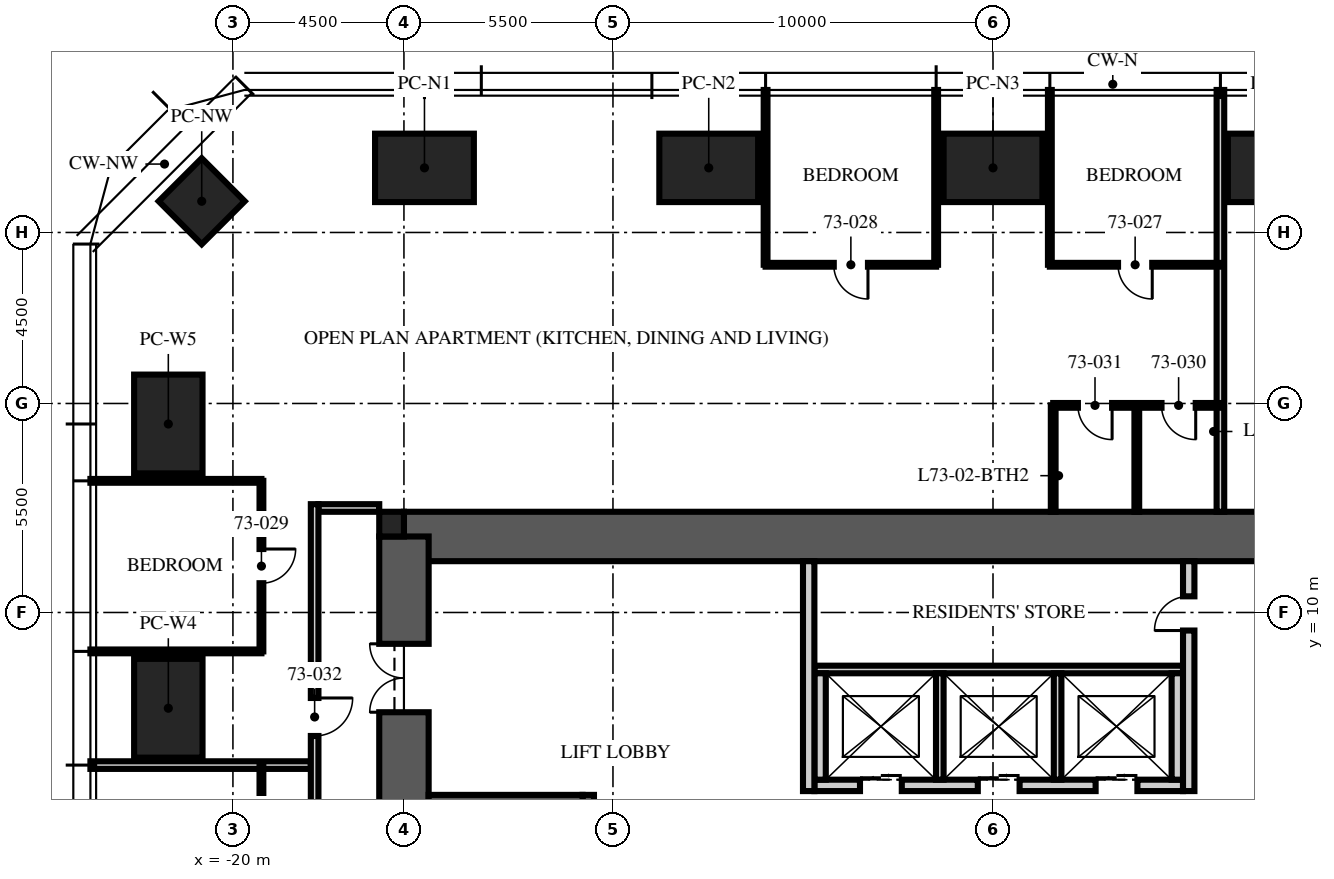
"""IFC4 building model, lengths in metres.
Left out: names, types, materials, properties, quantities, classifications, styles, units other than length and angle.
Written with IfcOpenShell. Run it as: python <this file> out.ifc"""

import sys

from ifc_helpers import new_model, si_unit, direction, frame, frame_2d, origin, origin_2d, place, context, subcontext, project, spatial, rectangle, extrude, element, fill, save


model = new_model("IFC4")
c1 = context("Model", 3, precision=1e-05, world=origin(), true_north=direction((0.0, 1.0)))
c2 = subcontext(c1, "Body", "Model", "MODEL_VIEW")
j1 = project(units=[si_unit("LENGTHUNIT", "METRE"), si_unit("PLANEANGLEUNIT", "RADIAN")], contexts=[c1])
p1 = place(None, origin())
s1 = spatial("IfcSite", under=j1, at=p1, CompositionType="ELEMENT")
p2 = place(p1, origin())
s2 = spatial("IfcBuilding", under=s1, at=p2, CompositionType="ELEMENT")
p3 = place(p2, frame((0.0, 0.0, 293.25)))
s3 = spatial("IfcBuildingStorey", under=s2, at=p3, CompositionType="ELEMENT", Elevation=293.25)
p4 = place(p3, frame((-15.5, 12.0, -0.25), z_axis=(0.0, 0.0, 1.0), x_axis=(1.0, 0.0, 0.0)))
e1 = element("IfcWall", 1, at=p4, inside=s3, PredefinedType="SHEAR", context=c2, shape_type="SweptSolid", body=[
    extrude(rectangle(XDim=31.0, YDim=1.3, at=frame_2d((15.5, 0.0))), origin(), (0.0, 0.0, 1.0), 3.75),
])
p5 = place(p3, frame((-15.5, -12.0, -0.25), z_axis=(0.0, 0.0, 1.0), x_axis=(0.0, 1.0, 0.0)))
e2 = element("IfcWall", 2, at=p5, inside=s3, PredefinedType="SHEAR", context=c2, shape_type="SweptSolid", body=[
    extrude(rectangle(XDim=24.0, YDim=1.3, at=frame_2d((12.0, 0.0))), origin(), (0.0, 0.0, 1.0), 3.75),
])
p6 = place(p5, frame((3.125, 0.0, 0.25)))
e3 = element("IfcOpeningElement", 3, at=p6, cuts=e2, PredefinedType="OPENING", context=c2, shape_type="SweptSolid", body=[
    extrude(rectangle(XDim=1.2, YDim=2.1, at=frame_2d((0.6, 1.05))), frame((0.0, 0.66, 0.0), z_axis=(0.0, -1.0, 0.0), x_axis=(1.0, 0.0, 0.0)), (0.0, 0.0, 1.0), 1.32),
])
p7 = place(p5, frame((19.375, 0.0, 0.25)))
e4 = element("IfcOpeningElement", 4, at=p7, cuts=e2, PredefinedType="OPENING", context=c2, shape_type="SweptSolid", body=[
    extrude(rectangle(XDim=1.8, YDim=2.1, at=frame_2d((0.9, 1.05))), frame((0.0, 0.66, 0.0), z_axis=(0.0, -1.0, 0.0), x_axis=(1.0, 0.0, 0.0)), (0.0, 0.0, 1.0), 1.32),
])
p8 = place(p3, frame((-15.825, 12.325, -0.25), z_axis=(0.0, 0.0, 1.0), x_axis=(1.0, 0.0, 0.0)))
e5 = element("IfcColumn", 5, at=p8, inside=s3, PredefinedType="COLUMN", context=c2, shape_type="SweptSolid", body=[
    extrude(rectangle(XDim=0.65, YDim=0.65, at=origin_2d()), origin(), (0.0, 0.0, 1.0), 3.75),
])
for number, where, z_axis, x_axis in (
    (6, (-14.96, 21.7, 0.0), (0.0, 0.0, 1.0), (1.0, 0.0, 0.0)),
    (7, (-7.48, 21.7, 0.0), (0.0, 0.0, 1.0), (1.0, 0.0, 0.0)),
    (8, (0.0, 21.7, 0.0), (0.0, 0.0, 1.0), (1.0, 0.0, 0.0)),
    (9, (7.48, 21.7, 0.0), (0.0, 0.0, 1.0), (1.0, 0.0, 0.0)),
    (10, (-21.7, 7.48, 0.0), (0.0, 0.0, 1.0), (0.0, 1.0, 0.0)),
    (11, (-21.7, 14.96, 0.0), (0.0, 0.0, 1.0), (0.0, 1.0, 0.0)),
):
    element("IfcColumn", number, at=place(p3, frame(where, z_axis=z_axis, x_axis=x_axis)), inside=s3, PredefinedType="COLUMN", context=c2, shape_type="SweptSolid", body=[
        extrude(rectangle(XDim=2.6, YDim=1.8, at=origin_2d()), origin(), (0.0, 0.0, 1.0), 3.75),
    ])
p9 = place(p3, frame((-20.821, 20.821, 0.0), z_axis=(0.0, 0.0, 1.0), x_axis=(0.707106781187, 0.707106781187, 0.0)))
e12 = element("IfcColumn", 12, at=p9, inside=s3, PredefinedType="COLUMN", context=c2, shape_type="SweptSolid", body=[
    extrude(rectangle(XDim=1.6, YDim=1.6, at=origin_2d()), origin(), (0.0, 0.0, 1.0), 3.75),
])
p10 = place(p3, frame((-10.65, -4.9, 0.0), z_axis=(0.0, 0.0, 1.0), x_axis=(0.0, 1.0, 0.0)))
e13 = element("IfcWall", 13, at=p10, inside=s3, PredefinedType="SOLIDWALL", context=c2, shape_type="SweptSolid", body=[
    extrude(rectangle(XDim=10.1, YDim=0.3, at=frame_2d((5.05, 0.0))), origin(), (0.0, 0.0, 1.0), 3.5),
])
p11 = place(p3, frame((-14.85, 5.05, 0.0), z_axis=(0.0, 0.0, 1.0), x_axis=(1.0, 0.0, 0.0)))
e14 = element("IfcWall", 14, at=p11, inside=s3, PredefinedType="SOLIDWALL", context=c2, shape_type="SweptSolid", body=[
    extrude(rectangle(XDim=4.05, YDim=0.3, at=frame_2d((2.025, 0.0))), origin(), (0.0, 0.0, 1.0), 3.5),
])
p12 = place(p3, frame((-4.7, 5.45, 0.0), z_axis=(0.0, 0.0, 1.0), x_axis=(1.0, 0.0, 0.0)))
e15 = element("IfcWall", 15, at=p12, inside=s3, PredefinedType="PARTITIONING", context=c2, shape_type="SweptSolid", body=[
    extrude(rectangle(XDim=9.7, YDim=0.3, at=frame_2d((4.85, 0.0))), origin(), (0.0, 0.0, 1.0), 3.5),
])
p13 = place(p12, frame((1.2, 0.0, 0.0)))
e16 = element("IfcOpeningElement", 16, at=p13, cuts=e15, PredefinedType="OPENING", context=c2, shape_type="SweptSolid", body=[
    extrude(rectangle(XDim=1.1, YDim=2.1, at=frame_2d((0.55, 1.05))), frame((0.0, 0.16, 0.0), z_axis=(0.0, -1.0, 0.0), x_axis=(1.0, 0.0, 0.0)), (0.0, 0.0, 1.0), 0.32),
])
p14 = place(p12, frame((4.3, 0.0, 0.0)))
e17 = element("IfcOpeningElement", 17, at=p14, cuts=e15, PredefinedType="OPENING", context=c2, shape_type="SweptSolid", body=[
    extrude(rectangle(XDim=1.1, YDim=2.1, at=frame_2d((0.55, 1.05))), frame((0.0, 0.16, 0.0), z_axis=(0.0, -1.0, 0.0), x_axis=(1.0, 0.0, 0.0)), (0.0, 0.0, 1.0), 0.32),
])
p15 = place(p12, frame((7.4, 0.0, 0.0)))
e18 = element("IfcOpeningElement", 18, at=p15, cuts=e15, PredefinedType="OPENING", context=c2, shape_type="SweptSolid", body=[
    extrude(rectangle(XDim=1.1, YDim=2.1, at=frame_2d((0.55, 1.05))), frame((0.0, 0.16, 0.0), z_axis=(0.0, -1.0, 0.0), x_axis=(1.0, 0.0, 0.0)), (0.0, 0.0, 1.0), 0.32),
])
p16 = place(p3, frame((-4.7, 8.5, 0.0), z_axis=(0.0, 0.0, 1.0), x_axis=(1.0, 0.0, 0.0)))
e19 = element("IfcWall", 19, at=p16, inside=s3, PredefinedType="PARTITIONING", context=c2, shape_type="SweptSolid", body=[
    extrude(rectangle(XDim=9.7, YDim=0.2, at=frame_2d((4.85, 0.0))), origin(), (0.0, 0.0, 1.0), 3.5),
])
for number, where, z_axis, x_axis in (
    (20, (-4.55, 5.6, 0.0), (0.0, 0.0, 1.0), (0.0, 1.0, 0.0)),
    (21, (4.85, 5.6, 0.0), (0.0, 0.0, 1.0), (0.0, 1.0, 0.0)),
):
    element("IfcWall", number, at=place(p3, frame(where, z_axis=z_axis, x_axis=x_axis)), inside=s3, PredefinedType="PARTITIONING", context=c2, shape_type="SweptSolid", body=[
        extrude(rectangle(XDim=2.8, YDim=0.3, at=frame_2d((1.4, 0.0))), origin(), (0.0, 0.0, 1.0), 3.5),
    ])
for number, where, z_axis, x_axis in (
    (22, (-1.4, 5.6, 0.0), (0.0, 0.0, 1.0), (0.0, 1.0, 0.0)),
    (23, (1.7, 5.6, 0.0), (0.0, 0.0, 1.0), (0.0, 1.0, 0.0)),
):
    element("IfcWall", number, at=place(p3, frame(where, z_axis=z_axis, x_axis=x_axis)), inside=s3, PredefinedType="PARTITIONING", context=c2, shape_type="SweptSolid", body=[
        extrude(rectangle(XDim=2.8, YDim=0.2, at=frame_2d((1.4, 0.0))), origin(), (0.0, 0.0, 1.0), 3.5),
    ])
p17 = place(p3, frame((-4.85, 5.3, 0.0), z_axis=(0.0, 0.0, 1.0), x_axis=(0.0, 1.0, 0.0)))
e24 = element("IfcWall", 24, at=p17, inside=s3, PredefinedType="PARTITIONING", context=c2, shape_type="SweptSolid", body=[
    extrude(rectangle(XDim=6.05, YDim=0.3, at=frame_2d((3.025, 0.0))), origin(), (0.0, 0.0, 1.0), 3.5),
])
p18 = place(p3, frame((5.15, 5.3, 0.0), z_axis=(0.0, 0.0, 1.0), x_axis=(0.0, 1.0, 0.0)))
e25 = element("IfcWall", 25, at=p18, inside=s3, PredefinedType="PARTITIONING", context=c2, shape_type="SweptSolid", body=[
    extrude(rectangle(XDim=6.05, YDim=0.3, at=frame_2d((3.025, 0.0))), origin(), (0.0, 0.0, 1.0), 3.5),
])
p19 = place(p18, frame((4.225, 0.0, 0.0)))
e26 = element("IfcOpeningElement", 26, at=p19, cuts=e25, PredefinedType="OPENING", context=c2, shape_type="SweptSolid", body=[
    extrude(rectangle(XDim=0.9, YDim=2.1, at=frame_2d((0.45, 1.05))), frame((0.0, 0.16, 0.0), z_axis=(0.0, -1.0, 0.0), x_axis=(1.0, 0.0, 0.0)), (0.0, 0.0, 1.0), 0.32),
])
p20 = place(p3, frame((-16.15, 12.75, 0.0), z_axis=(0.0, 0.0, 1.0), x_axis=(-1.0, 0.0, 0.0)))
e27 = element("IfcWall", 27, at=p20, inside=s3, PredefinedType="PARTITIONING", context=c2, shape_type="SweptSolid", body=[
    extrude(rectangle(XDim=1.6, YDim=0.2, at=frame_2d((0.8, 0.0))), origin(), (0.0, 0.0, 1.0), 2.6),
])
p21 = place(p3, frame((5.984, 12.65, 0.0), z_axis=(0.0, 0.0, 1.0), x_axis=(0.0, 1.0, 0.0)))
e28 = element("IfcWall", 28, at=p21, inside=s3, PredefinedType="PARTITIONING", context=c2, shape_type="SweptSolid", body=[
    extrude(rectangle(XDim=11.1, YDim=0.2, at=frame_2d((5.55, 0.0))), origin(), (0.0, 0.0, 1.0), 3.01),
])
for number, where, z_axis, x_axis in (
    (29, (1.496, 19.15, 0.0), (0.0, 0.0, 1.0), (0.0, 1.0, 0.0)),
    (30, (-1.496, 19.15, 0.0), (0.0, 0.0, 1.0), (0.0, 1.0, 0.0)),
    (31, (-5.984, 19.15, 0.0), (0.0, 0.0, 1.0), (0.0, 1.0, 0.0)),
):
    element("IfcWall", number, at=place(p3, frame(where, z_axis=z_axis, x_axis=x_axis)), inside=s3, PredefinedType="PARTITIONING", context=c2, shape_type="SweptSolid", body=[
        extrude(rectangle(XDim=4.6, YDim=0.1, at=frame_2d((2.3, 0.0))), origin(), (0.0, 0.0, 1.0), 3.01),
    ])
for number, where, z_axis, x_axis in (
    (32, (-19.25, 13.464, 0.0), (0.0, 0.0, 1.0), (-1.0, 0.0, 0.0)),
    (33, (-19.25, 8.976, 0.0), (0.0, 0.0, 1.0), (-1.0, 0.0, 0.0)),
):
    element("IfcWall", number, at=place(p3, frame(where, z_axis=z_axis, x_axis=x_axis)), inside=s3, PredefinedType="PARTITIONING", context=c2, shape_type="SweptSolid", body=[
        extrude(rectangle(XDim=4.5, YDim=0.1, at=frame_2d((2.25, 0.0))), origin(), (0.0, 0.0, 1.0), 3.01),
    ])
p22 = place(p3, frame((-17.95, 5.984, 0.0), z_axis=(0.0, 0.0, 1.0), x_axis=(-1.0, 0.0, 0.0)))
e34 = element("IfcWall", 34, at=p22, inside=s3, PredefinedType="PARTITIONING", context=c2, shape_type="SweptSolid", body=[
    extrude(rectangle(XDim=5.8, YDim=0.2, at=frame_2d((2.9, 0.0))), origin(), (0.0, 0.0, 1.0), 3.01),
])
p23 = place(p3, frame((5.984, 19.15, 0.0), z_axis=(0.0, 0.0, 1.0), x_axis=(-1.0, 0.0, 0.0)))
e35 = element("IfcWall", 35, at=p23, inside=s3, PredefinedType="PARTITIONING", context=c2, shape_type="SweptSolid", body=[
    extrude(rectangle(XDim=4.488, YDim=0.1, at=frame_2d((2.244, 0.0))), origin(), (0.0, 0.0, 1.0), 2.91),
])
p24 = place(p23, frame((1.794, 0.0, 0.0)))
e36 = element("IfcOpeningElement", 36, at=p24, cuts=e35, PredefinedType="OPENING", context=c2, shape_type="SweptSolid", body=[
    extrude(rectangle(XDim=0.9, YDim=2.1, at=frame_2d((0.45, 1.05))), frame((0.0, 0.06, 0.0), z_axis=(0.0, -1.0, 0.0), x_axis=(1.0, 0.0, 0.0)), (0.0, 0.0, 1.0), 0.12),
])
p25 = place(p3, frame((-1.496, 19.15, 0.0), z_axis=(0.0, 0.0, 1.0), x_axis=(-1.0, 0.0, 0.0)))
e37 = element("IfcWall", 37, at=p25, inside=s3, PredefinedType="PARTITIONING", context=c2, shape_type="SweptSolid", body=[
    extrude(rectangle(XDim=4.488, YDim=0.1, at=frame_2d((2.244, 0.0))), origin(), (0.0, 0.0, 1.0), 2.91),
])
p26 = place(p25, frame((1.794, 0.0, 0.0)))
e38 = element("IfcOpeningElement", 38, at=p26, cuts=e37, PredefinedType="OPENING", context=c2, shape_type="SweptSolid", body=[
    extrude(rectangle(XDim=0.9, YDim=2.1, at=frame_2d((0.45, 1.05))), frame((0.0, 0.06, 0.0), z_axis=(0.0, -1.0, 0.0), x_axis=(1.0, 0.0, 0.0)), (0.0, 0.0, 1.0), 0.12),
])
p27 = place(p3, frame((-19.25, 13.464, 0.0), z_axis=(0.0, 0.0, 1.0), x_axis=(0.0, -1.0, 0.0)))
e39 = element("IfcWall", 39, at=p27, inside=s3, PredefinedType="PARTITIONING", context=c2, shape_type="SweptSolid", body=[
    extrude(rectangle(XDim=4.488, YDim=0.1, at=frame_2d((2.244, 0.0))), origin(), (0.0, 0.0, 1.0), 2.91),
])
p28 = place(p27, frame((1.794, 0.0, 0.0)))
e40 = element("IfcOpeningElement", 40, at=p28, cuts=e39, PredefinedType="OPENING", context=c2, shape_type="SweptSolid", body=[
    extrude(rectangle(XDim=0.9, YDim=2.1, at=frame_2d((0.45, 1.05))), frame((0.0, 0.06, 0.0), z_axis=(0.0, -1.0, 0.0), x_axis=(1.0, 0.0, 0.0)), (0.0, 0.0, 1.0), 0.12),
])
p29 = place(p3, frame((5.984, 15.45, 0.0), z_axis=(0.0, 0.0, 1.0), x_axis=(-1.0, 0.0, 0.0)))
e41 = element("IfcWall", 41, at=p29, inside=s3, PredefinedType="PARTITIONING", context=c2, shape_type="SweptSolid", body=[
    extrude(rectangle(XDim=4.4, YDim=0.125, at=frame_2d((2.2, 0.0))), origin(), (0.0, 0.0, 1.0), 2.91),
])
p30 = place(p29, frame((0.65, 0.0, 0.0)))
e42 = element("IfcOpeningElement", 42, at=p30, cuts=e41, PredefinedType="OPENING", context=c2, shape_type="SweptSolid", body=[
    extrude(rectangle(XDim=0.9, YDim=2.1, at=frame_2d((0.45, 1.05))), frame((0.0, 0.073, 0.0), z_axis=(0.0, -1.0, 0.0), x_axis=(1.0, 0.0, 0.0)), (0.0, 0.0, 1.0), 0.145),
])
p31 = place(p29, frame((2.85, 0.0, 0.0)))
e43 = element("IfcOpeningElement", 43, at=p31, cuts=e41, PredefinedType="OPENING", context=c2, shape_type="SweptSolid", body=[
    extrude(rectangle(XDim=0.9, YDim=2.1, at=frame_2d((0.45, 1.05))), frame((0.0, 0.073, 0.0), z_axis=(0.0, -1.0, 0.0), x_axis=(1.0, 0.0, 0.0)), (0.0, 0.0, 1.0), 0.145),
])
p32 = place(p3, frame((3.784, 12.65, 0.0), z_axis=(0.0, 0.0, 1.0), x_axis=(0.0, 1.0, 0.0)))
e44 = element("IfcWall", 44, at=p32, inside=s3, PredefinedType="PARTITIONING", context=c2, shape_type="SweptSolid", body=[
    extrude(rectangle(XDim=2.8, YDim=0.125, at=frame_2d((1.4, 0.0))), origin(), (0.0, 0.0, 1.0), 2.91),
])
p33 = place(p3, frame((1.584, 12.65, 0.0), z_axis=(0.0, 0.0, 1.0), x_axis=(0.0, 1.0, 0.0)))
e45 = element("IfcWall", 45, at=p33, inside=s3, PredefinedType="PARTITIONING", context=c2, shape_type="SweptSolid", body=[
    extrude(rectangle(XDim=2.8, YDim=0.125, at=frame_2d((1.4, 0.0))), origin(), (0.0, 0.0, 1.0), 3.5),
])
p34 = place(p3, frame((-19.25, 5.984, 0.0), z_axis=(0.0, 0.0, 1.0), x_axis=(0.0, -1.0, 0.0)))
e46 = element("IfcWall", 46, at=p34, inside=s3, PredefinedType="PARTITIONING", context=c2, shape_type="SweptSolid", body=[
    extrude(rectangle(XDim=4.488, YDim=0.1, at=frame_2d((2.244, 0.0))), origin(), (0.0, 0.0, 1.0), 2.91),
])
p35 = place(p34, frame((1.794, 0.0, 0.0)))
e47 = element("IfcOpeningElement", 47, at=p35, cuts=e46, PredefinedType="OPENING", context=c2, shape_type="SweptSolid", body=[
    extrude(rectangle(XDim=0.9, YDim=2.1, at=frame_2d((0.45, 1.05))), frame((0.0, 0.06, 0.0), z_axis=(0.0, -1.0, 0.0), x_axis=(1.0, 0.0, 0.0)), (0.0, 0.0, 1.0), 0.12),
])
p36 = place(p3, frame((-17.85, 12.85, 0.0), z_axis=(0.0, 0.0, 1.0), x_axis=(0.0, -1.0, 0.0)))
e48 = element("IfcWall", 48, at=p36, inside=s3, PredefinedType="PARTITIONING", context=c2, shape_type="SweptSolid", body=[
    extrude(rectangle(XDim=25.5, YDim=0.2, at=frame_2d((12.75, 0.0))), origin(), (0.0, 0.0, 1.0), 2.9),
])
p37 = place(p36, frame((5.1, 0.0, 0.0)))
e49 = element("IfcOpeningElement", 49, at=p37, cuts=e48, PredefinedType="OPENING", context=c2, shape_type="SweptSolid", body=[
    extrude(rectangle(XDim=1.0, YDim=2.2, at=frame_2d((0.5, 1.1))), frame((0.0, 0.11, 0.0), z_axis=(0.0, -1.0, 0.0), x_axis=(1.0, 0.0, 0.0)), (0.0, 0.0, 1.0), 0.22),
])
p38 = place(p36, frame((23.386, 0.0, 0.0)))
e50 = element("IfcOpeningElement", 50, at=p38, cuts=e48, PredefinedType="OPENING", context=c2, shape_type="SweptSolid", body=[
    extrude(rectangle(XDim=1.0, YDim=2.2, at=frame_2d((0.5, 1.1))), frame((0.0, 0.11, 0.0), z_axis=(0.0, -1.0, 0.0), x_axis=(1.0, 0.0, 0.0)), (0.0, 0.0, 1.0), 0.22),
])
p39 = place(p7, origin())
e51 = element("IfcDoor", 51, at=p39, inside=s3, OperationType="DOUBLE_DOOR_SINGLE_SWING", PredefinedType="DOOR", context=c2, shape_type="SweptSolid", body=[
    extrude(rectangle(XDim=1.8, YDim=2.1, at=frame_2d((0.9, 1.05))), frame((0.0, 0.025, 0.0), z_axis=(0.0, -1.0, 0.0), x_axis=(1.0, 0.0, 0.0)), (0.0, 0.0, 1.0), 0.05),
])
fill(e4, e51)
p40 = place(p13, origin())
e52 = element("IfcDoor", 52, at=p40, inside=s3, OperationType="DOUBLE_DOOR_SLIDING", PredefinedType="DOOR", context=c2, shape_type="SweptSolid", body=[
    extrude(rectangle(XDim=1.1, YDim=2.1, at=frame_2d((0.55, 1.05))), frame((0.0, 0.025, 0.0), z_axis=(0.0, -1.0, 0.0), x_axis=(1.0, 0.0, 0.0)), (0.0, 0.0, 1.0), 0.05),
])
fill(e16, e52)
p41 = place(p14, origin())
e53 = element("IfcDoor", 53, at=p41, inside=s3, OperationType="DOUBLE_DOOR_SLIDING", PredefinedType="DOOR", context=c2, shape_type="SweptSolid", body=[
    extrude(rectangle(XDim=1.1, YDim=2.1, at=frame_2d((0.55, 1.05))), frame((0.0, 0.025, 0.0), z_axis=(0.0, -1.0, 0.0), x_axis=(1.0, 0.0, 0.0)), (0.0, 0.0, 1.0), 0.05),
])
fill(e17, e53)
p42 = place(p15, origin())
e54 = element("IfcDoor", 54, at=p42, inside=s3, OperationType="DOUBLE_DOOR_SLIDING", PredefinedType="DOOR", context=c2, shape_type="SweptSolid", body=[
    extrude(rectangle(XDim=1.1, YDim=2.1, at=frame_2d((0.55, 1.05))), frame((0.0, 0.025, 0.0), z_axis=(0.0, -1.0, 0.0), x_axis=(1.0, 0.0, 0.0)), (0.0, 0.0, 1.0), 0.05),
])
fill(e18, e54)
p43 = place(p19, origin())
e55 = element("IfcDoor", 55, at=p43, inside=s3, OperationType="SINGLE_SWING_LEFT", PredefinedType="DOOR", context=c2, shape_type="SweptSolid", body=[
    extrude(rectangle(XDim=0.9, YDim=2.1, at=frame_2d((0.45, 1.05))), frame((0.0, 0.025, 0.0), z_axis=(0.0, -1.0, 0.0), x_axis=(1.0, 0.0, 0.0)), (0.0, 0.0, 1.0), 0.05),
])
fill(e26, e55)
p44 = place(p24, origin())
e56 = element("IfcDoor", 56, at=p44, inside=s3, OperationType="SINGLE_SWING_LEFT", PredefinedType="DOOR", context=c2, shape_type="SweptSolid", body=[
    extrude(rectangle(XDim=0.9, YDim=2.1, at=frame_2d((0.45, 1.05))), frame((0.0, 0.025, 0.0), z_axis=(0.0, -1.0, 0.0), x_axis=(1.0, 0.0, 0.0)), (0.0, 0.0, 1.0), 0.05),
])
fill(e36, e56)
p45 = place(p26, origin())
e57 = element("IfcDoor", 57, at=p45, inside=s3, OperationType="SINGLE_SWING_LEFT", PredefinedType="DOOR", context=c2, shape_type="SweptSolid", body=[
    extrude(rectangle(XDim=0.9, YDim=2.1, at=frame_2d((0.45, 1.05))), frame((0.0, 0.025, 0.0), z_axis=(0.0, -1.0, 0.0), x_axis=(1.0, 0.0, 0.0)), (0.0, 0.0, 1.0), 0.05),
])
fill(e38, e57)
p46 = place(p28, origin())
e58 = element("IfcDoor", 58, at=p46, inside=s3, OperationType="SINGLE_SWING_LEFT", PredefinedType="DOOR", context=c2, shape_type="SweptSolid", body=[
    extrude(rectangle(XDim=0.9, YDim=2.1, at=frame_2d((0.45, 1.05))), frame((0.0, 0.025, 0.0), z_axis=(0.0, -1.0, 0.0), x_axis=(1.0, 0.0, 0.0)), (0.0, 0.0, 1.0), 0.05),
])
fill(e40, e58)
p47 = place(p30, origin())
e59 = element("IfcDoor", 59, at=p47, inside=s3, OperationType="SINGLE_SWING_LEFT", PredefinedType="DOOR", context=c2, shape_type="SweptSolid", body=[
    extrude(rectangle(XDim=0.9, YDim=2.1, at=frame_2d((0.45, 1.05))), frame((0.0, 0.025, 0.0), z_axis=(0.0, -1.0, 0.0), x_axis=(1.0, 0.0, 0.0)), (0.0, 0.0, 1.0), 0.05),
])
fill(e42, e59)
p48 = place(p31, origin())
e60 = element("IfcDoor", 60, at=p48, inside=s3, OperationType="SINGLE_SWING_LEFT", PredefinedType="DOOR", context=c2, shape_type="SweptSolid", body=[
    extrude(rectangle(XDim=0.9, YDim=2.1, at=frame_2d((0.45, 1.05))), frame((0.0, 0.025, 0.0), z_axis=(0.0, -1.0, 0.0), x_axis=(1.0, 0.0, 0.0)), (0.0, 0.0, 1.0), 0.05),
])
fill(e43, e60)
p49 = place(p37, origin())
e61 = element("IfcDoor", 61, at=p49, inside=s3, OperationType="SINGLE_SWING_LEFT", PredefinedType="DOOR", context=c2, shape_type="SweptSolid", body=[
    extrude(rectangle(XDim=1.0, YDim=2.2, at=frame_2d((0.5, 1.1))), frame((0.0, 0.025, 0.0), z_axis=(0.0, -1.0, 0.0), x_axis=(1.0, 0.0, 0.0)), (0.0, 0.0, 1.0), 0.05),
])
fill(e49, e61)
save(model, sys.argv[1])
